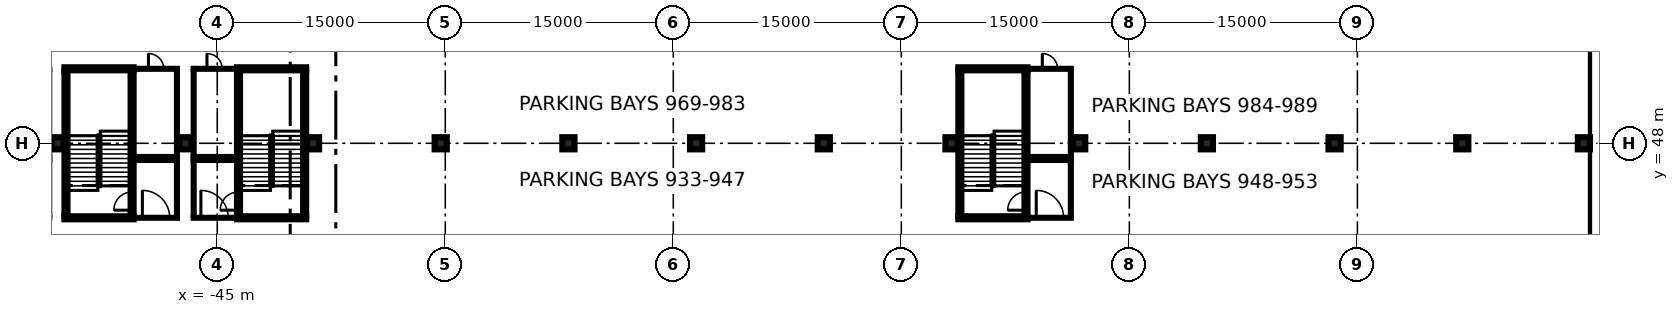
"""IFC4 building model, lengths in metres.
Left out: names, types, materials, properties, quantities, classifications, styles, units other than length and angle.
Written with IfcOpenShell. Run it as: python <this file> out.ifc"""

import sys

from ifc_helpers import new_model, si_unit, direction, frame, frame_2d, origin, origin_2d, place, context, subcontext, project, spatial, rectangle, extrude, element, fill, save


model = new_model("IFC4")
c1 = context("Model", 3, precision=1e-05, world=origin(), true_north=direction((0.0, 1.0)))
c2 = subcontext(c1, "Body", "Model", "MODEL_VIEW")
j1 = project(units=[si_unit("LENGTHUNIT", "METRE"), si_unit("PLANEANGLEUNIT", "RADIAN")], contexts=[c1])
p1 = place(None, origin())
s1 = spatial("IfcSite", under=j1, at=p1, CompositionType="ELEMENT")
p2 = place(p1, origin())
s2 = spatial("IfcBuilding", under=s1, at=p2, CompositionType="ELEMENT")
p3 = place(p2, frame((0.0, 0.0, -12.0)))
s3 = spatial("IfcBuildingStorey", under=s2, at=p3, CompositionType="ELEMENT", Elevation=-12.0)
p4 = place(p3, frame((45.75, -80.0, 0.0), z_axis=(0.0, 0.0, 1.0), x_axis=(0.0, 1.0, 0.0)))
e1 = element("IfcWall", 1, at=p4, inside=s3, PredefinedType="USERDEFINED", context=c2, shape_type="SweptSolid", body=[
    extrude(rectangle(XDim=160.0, YDim=0.9, at=frame_2d((80.0, 0.0))), origin(), (0.0, 0.0, 1.0), 11.55),
])
p5 = place(p2, frame((0.0, 0.0, -7.2)))
s4 = spatial("IfcBuildingStorey", under=s2, at=p5, CompositionType="ELEMENT", Elevation=-7.2)
for number, where, z_axis, x_axis in (
    (2, (-55.5, 48.0, -0.4), (0.0, 0.0, 1.0), (1.0, 0.0, 0.0)),
    (3, (-47.1, 48.0, -0.4), (0.0, 0.0, 1.0), (1.0, 0.0, 0.0)),
    (4, (-38.7, 48.0, -0.4), (0.0, 0.0, 1.0), (1.0, 0.0, 0.0)),
    (5, (-30.3, 48.0, -0.4), (0.0, 0.0, 1.0), (1.0, 0.0, 0.0)),
    (6, (-21.9, 48.0, -0.4), (0.0, 0.0, 1.0), (1.0, 0.0, 0.0)),
    (7, (-13.5, 48.0, -0.4), (0.0, 0.0, 1.0), (1.0, 0.0, 0.0)),
    (8, (-5.1, 48.0, -0.4), (0.0, 0.0, 1.0), (1.0, 0.0, 0.0)),
    (9, (3.3, 48.0, -0.4), (0.0, 0.0, 1.0), (1.0, 0.0, 0.0)),
    (10, (11.7, 48.0, -0.4), (0.0, 0.0, 1.0), (1.0, 0.0, 0.0)),
    (11, (20.1, 48.0, -0.4), (0.0, 0.0, 1.0), (1.0, 0.0, 0.0)),
    (12, (28.5, 48.0, -0.4), (0.0, 0.0, 1.0), (1.0, 0.0, 0.0)),
    (13, (36.9, 48.0, -0.4), (0.0, 0.0, 1.0), (1.0, 0.0, 0.0)),
    (14, (44.9, 48.0, -0.4), (0.0, 0.0, 1.0), (1.0, 0.0, 0.0)),
):
    element("IfcColumn", number, at=place(p5, frame(where, z_axis=z_axis, x_axis=x_axis)), inside=s4, PredefinedType="COLUMN", context=c2, shape_type="SweptSolid", body=[
        extrude(rectangle(XDim=0.8, YDim=0.8, at=origin_2d()), origin(), (0.0, 0.0, 1.0), 3.6),
    ])
p6 = place(p5, frame((-50.5, 43.1, 0.0), z_axis=(0.0, 0.0, 1.0), x_axis=(1.0, 0.0, 0.0)))
e15 = element("IfcWall", 15, at=p6, inside=s4, PredefinedType="PARTITIONING", context=c2, shape_type="SweptSolid", body=[
    extrude(rectangle(XDim=2.95, YDim=0.2, at=frame_2d((1.475, 0.0))), origin(), (0.0, 0.0, 1.0), 3.2),
])
p7 = place(p6, frame((0.575, 0.0, 0.0)))
e16 = element("IfcOpeningElement", 16, at=p7, cuts=e15, PredefinedType="OPENING", context=c2, shape_type="SweptSolid", body=[
    extrude(rectangle(XDim=1.8, YDim=2.1, at=frame_2d((0.9, 1.05))), frame((0.0, 0.11, 0.0), z_axis=(0.0, -1.0, 0.0), x_axis=(1.0, 0.0, 0.0)), (0.0, 0.0, 1.0), 0.22),
])
p8 = place(p5, frame((-50.5, 46.9, 0.0), z_axis=(0.0, 0.0, 1.0), x_axis=(1.0, 0.0, 0.0)))
e17 = element("IfcWall", 17, at=p8, inside=s4, PredefinedType="PARTITIONING", context=c2, shape_type="SweptSolid", body=[
    extrude(rectangle(XDim=2.95, YDim=0.2, at=frame_2d((1.475, 0.0))), origin(), (0.0, 0.0, 1.0), 3.2),
])
p9 = place(p5, frame((-47.65, 43.2, 0.0), z_axis=(0.0, 0.0, 1.0), x_axis=(0.0, 1.0, 0.0)))
e18 = element("IfcWall", 18, at=p9, inside=s4, PredefinedType="PARTITIONING", context=c2, shape_type="SweptSolid", body=[
    extrude(rectangle(XDim=3.6, YDim=0.2, at=frame_2d((1.8, 0.0))), origin(), (0.0, 0.0, 1.0), 3.2),
])
p10 = place(p5, frame((-50.5, 47.1, 0.0), z_axis=(0.0, 0.0, 1.0), x_axis=(1.0, 0.0, 0.0)))
e19 = element("IfcWall", 19, at=p10, inside=s4, PredefinedType="PARTITIONING", context=c2, shape_type="SweptSolid", body=[
    extrude(rectangle(XDim=2.95, YDim=0.2, at=frame_2d((1.475, 0.0))), origin(), (0.0, 0.0, 1.0), 3.2),
])
p11 = place(p5, frame((-50.5, 52.9, 0.0), z_axis=(0.0, 0.0, 1.0), x_axis=(1.0, 0.0, 0.0)))
e20 = element("IfcWall", 20, at=p11, inside=s4, PredefinedType="PARTITIONING", context=c2, shape_type="SweptSolid", body=[
    extrude(rectangle(XDim=2.95, YDim=0.2, at=frame_2d((1.475, 0.0))), origin(), (0.0, 0.0, 1.0), 3.2),
])
p12 = place(p11, frame((0.975, 0.0, 0.0)))
e21 = element("IfcOpeningElement", 21, at=p12, cuts=e20, PredefinedType="OPENING", context=c2, shape_type="SweptSolid", body=[
    extrude(rectangle(XDim=1.0, YDim=2.1, at=frame_2d((0.5, 1.05))), frame((0.0, 0.11, 0.0), z_axis=(0.0, -1.0, 0.0), x_axis=(1.0, 0.0, 0.0)), (0.0, 0.0, 1.0), 0.22),
])
p13 = place(p5, frame((-47.65, 47.2, 0.0), z_axis=(0.0, 0.0, 1.0), x_axis=(0.0, 1.0, 0.0)))
e22 = element("IfcWall", 22, at=p13, inside=s4, PredefinedType="PARTITIONING", context=c2, shape_type="SweptSolid", body=[
    extrude(rectangle(XDim=5.6, YDim=0.2, at=frame_2d((2.8, 0.0))), origin(), (0.0, 0.0, 1.0), 3.2),
])
p14 = place(p5, frame((8.3, 43.1, 0.0), z_axis=(0.0, 0.0, 1.0), x_axis=(1.0, 0.0, 0.0)))
e23 = element("IfcWall", 23, at=p14, inside=s4, PredefinedType="PARTITIONING", context=c2, shape_type="SweptSolid", body=[
    extrude(rectangle(XDim=2.95, YDim=0.2, at=frame_2d((1.475, 0.0))), origin(), (0.0, 0.0, 1.0), 3.2),
])
p15 = place(p14, frame((0.575, 0.0, 0.0)))
e24 = element("IfcOpeningElement", 24, at=p15, cuts=e23, PredefinedType="OPENING", context=c2, shape_type="SweptSolid", body=[
    extrude(rectangle(XDim=1.8, YDim=2.1, at=frame_2d((0.9, 1.05))), frame((0.0, 0.11, 0.0), z_axis=(0.0, -1.0, 0.0), x_axis=(1.0, 0.0, 0.0)), (0.0, 0.0, 1.0), 0.22),
])
p16 = place(p5, frame((8.3, 46.9, 0.0), z_axis=(0.0, 0.0, 1.0), x_axis=(1.0, 0.0, 0.0)))
e25 = element("IfcWall", 25, at=p16, inside=s4, PredefinedType="PARTITIONING", context=c2, shape_type="SweptSolid", body=[
    extrude(rectangle(XDim=2.95, YDim=0.2, at=frame_2d((1.475, 0.0))), origin(), (0.0, 0.0, 1.0), 3.2),
])
p17 = place(p5, frame((11.15, 43.2, 0.0), z_axis=(0.0, 0.0, 1.0), x_axis=(0.0, 1.0, 0.0)))
e26 = element("IfcWall", 26, at=p17, inside=s4, PredefinedType="PARTITIONING", context=c2, shape_type="SweptSolid", body=[
    extrude(rectangle(XDim=3.6, YDim=0.2, at=frame_2d((1.8, 0.0))), origin(), (0.0, 0.0, 1.0), 3.2),
])
p18 = place(p5, frame((8.3, 47.1, 0.0), z_axis=(0.0, 0.0, 1.0), x_axis=(1.0, 0.0, 0.0)))
e27 = element("IfcWall", 27, at=p18, inside=s4, PredefinedType="PARTITIONING", context=c2, shape_type="SweptSolid", body=[
    extrude(rectangle(XDim=2.95, YDim=0.2, at=frame_2d((1.475, 0.0))), origin(), (0.0, 0.0, 1.0), 3.2),
])
p19 = place(p5, frame((8.3, 52.9, 0.0), z_axis=(0.0, 0.0, 1.0), x_axis=(1.0, 0.0, 0.0)))
e28 = element("IfcWall", 28, at=p19, inside=s4, PredefinedType="PARTITIONING", context=c2, shape_type="SweptSolid", body=[
    extrude(rectangle(XDim=2.95, YDim=0.2, at=frame_2d((1.475, 0.0))), origin(), (0.0, 0.0, 1.0), 3.2),
])
p20 = place(p19, frame((0.975, 0.0, 0.0)))
e29 = element("IfcOpeningElement", 29, at=p20, cuts=e28, PredefinedType="OPENING", context=c2, shape_type="SweptSolid", body=[
    extrude(rectangle(XDim=1.0, YDim=2.1, at=frame_2d((0.5, 1.05))), frame((0.0, 0.11, 0.0), z_axis=(0.0, -1.0, 0.0), x_axis=(1.0, 0.0, 0.0)), (0.0, 0.0, 1.0), 0.22),
])
p21 = place(p5, frame((11.15, 47.2, 0.0), z_axis=(0.0, 0.0, 1.0), x_axis=(0.0, 1.0, 0.0)))
e30 = element("IfcWall", 30, at=p21, inside=s4, PredefinedType="PARTITIONING", context=c2, shape_type="SweptSolid", body=[
    extrude(rectangle(XDim=5.6, YDim=0.2, at=frame_2d((2.8, 0.0))), origin(), (0.0, 0.0, 1.0), 3.2),
])
p22 = place(p5, frame((-46.65, 43.1, 0.0), z_axis=(0.0, 0.0, 1.0), x_axis=(1.0, 0.0, 0.0)))
e31 = element("IfcWall", 31, at=p22, inside=s4, PredefinedType="PARTITIONING", context=c2, shape_type="SweptSolid", body=[
    extrude(rectangle(XDim=2.95, YDim=0.2, at=frame_2d((1.475, 0.0))), origin(), (0.0, 0.0, 1.0), 3.2),
])
p23 = place(p22, frame((0.575, 0.0, 0.0)))
e32 = element("IfcOpeningElement", 32, at=p23, cuts=e31, PredefinedType="OPENING", context=c2, shape_type="SweptSolid", body=[
    extrude(rectangle(XDim=1.8, YDim=2.1, at=frame_2d((0.9, 1.05))), frame((0.0, 0.11, 0.0), z_axis=(0.0, -1.0, 0.0), x_axis=(1.0, 0.0, 0.0)), (0.0, 0.0, 1.0), 0.22),
])
p24 = place(p5, frame((-46.65, 46.9, 0.0), z_axis=(0.0, 0.0, 1.0), x_axis=(1.0, 0.0, 0.0)))
e33 = element("IfcWall", 33, at=p24, inside=s4, PredefinedType="PARTITIONING", context=c2, shape_type="SweptSolid", body=[
    extrude(rectangle(XDim=2.95, YDim=0.2, at=frame_2d((1.475, 0.0))), origin(), (0.0, 0.0, 1.0), 3.2),
])
p25 = place(p5, frame((-46.55, 43.2, 0.0), z_axis=(0.0, 0.0, 1.0), x_axis=(0.0, 1.0, 0.0)))
e34 = element("IfcWall", 34, at=p25, inside=s4, PredefinedType="PARTITIONING", context=c2, shape_type="SweptSolid", body=[
    extrude(rectangle(XDim=3.6, YDim=0.2, at=frame_2d((1.8, 0.0))), origin(), (0.0, 0.0, 1.0), 3.2),
])
p26 = place(p5, frame((-46.65, 47.1, 0.0), z_axis=(0.0, 0.0, 1.0), x_axis=(1.0, 0.0, 0.0)))
e35 = element("IfcWall", 35, at=p26, inside=s4, PredefinedType="PARTITIONING", context=c2, shape_type="SweptSolid", body=[
    extrude(rectangle(XDim=2.95, YDim=0.2, at=frame_2d((1.475, 0.0))), origin(), (0.0, 0.0, 1.0), 3.2),
])
p27 = place(p5, frame((-46.65, 52.9, 0.0), z_axis=(0.0, 0.0, 1.0), x_axis=(1.0, 0.0, 0.0)))
e36 = element("IfcWall", 36, at=p27, inside=s4, PredefinedType="PARTITIONING", context=c2, shape_type="SweptSolid", body=[
    extrude(rectangle(XDim=2.95, YDim=0.2, at=frame_2d((1.475, 0.0))), origin(), (0.0, 0.0, 1.0), 3.2),
])
p28 = place(p27, frame((0.975, 0.0, 0.0)))
e37 = element("IfcOpeningElement", 37, at=p28, cuts=e36, PredefinedType="OPENING", context=c2, shape_type="SweptSolid", body=[
    extrude(rectangle(XDim=1.0, YDim=2.1, at=frame_2d((0.5, 1.05))), frame((0.0, 0.11, 0.0), z_axis=(0.0, -1.0, 0.0), x_axis=(1.0, 0.0, 0.0)), (0.0, 0.0, 1.0), 0.22),
])
p29 = place(p5, frame((-46.55, 47.2, 0.0), z_axis=(0.0, 0.0, 1.0), x_axis=(0.0, 1.0, 0.0)))
e38 = element("IfcWall", 38, at=p29, inside=s4, PredefinedType="PARTITIONING", context=c2, shape_type="SweptSolid", body=[
    extrude(rectangle(XDim=5.6, YDim=0.2, at=frame_2d((2.8, 0.0))), origin(), (0.0, 0.0, 1.0), 3.2),
])
p30 = place(p5, frame((-54.95, 43.2, 0.0), z_axis=(0.0, 0.0, 1.0), x_axis=(0.0, 1.0, 0.0)))
e39 = element("IfcWall", 39, at=p30, inside=s4, PredefinedType="SOLIDWALL", context=c2, shape_type="SweptSolid", body=[
    extrude(rectangle(XDim=9.6, YDim=0.2, at=frame_2d((4.8, 0.0))), origin(), (0.0, 0.0, 1.0), 3.2),
])
p31 = place(p5, frame((-50.6, 43.2, 0.0), z_axis=(0.0, 0.0, 1.0), x_axis=(0.0, 1.0, 0.0)))
e40 = element("IfcWall", 40, at=p31, inside=s4, PredefinedType="SOLIDWALL", context=c2, shape_type="SweptSolid", body=[
    extrude(rectangle(XDim=9.6, YDim=0.2, at=frame_2d((4.8, 0.0))), origin(), (0.0, 0.0, 1.0), 3.2),
])
p32 = place(p31, frame((0.4, 0.0, 0.0)))
e41 = element("IfcOpeningElement", 41, at=p32, cuts=e40, PredefinedType="OPENING", context=c2, shape_type="SweptSolid", body=[
    extrude(rectangle(XDim=1.2, YDim=2.1, at=frame_2d((0.6, 1.05))), frame((0.0, 0.11, 0.0), z_axis=(0.0, -1.0, 0.0), x_axis=(1.0, 0.0, 0.0)), (0.0, 0.0, 1.0), 0.22),
])
for number, where, z_axis, x_axis in (
    (42, (-50.5, 43.1, 0.0), (0.0, 0.0, 1.0), (-1.0, 0.0, 0.0)),
    (43, (-55.05, 52.9, 0.0), (0.0, 0.0, 1.0), (1.0, 0.0, 0.0)),
):
    element("IfcWall", number, at=place(p5, frame(where, z_axis=z_axis, x_axis=x_axis)), inside=s4, PredefinedType="SOLIDWALL", context=c2, shape_type="SweptSolid", body=[
        extrude(rectangle(XDim=4.55, YDim=0.2, at=frame_2d((2.275, 0.0))), origin(), (0.0, 0.0, 1.0), 3.2),
    ])
p33 = place(p5, frame((3.85, 43.2, 0.0), z_axis=(0.0, 0.0, 1.0), x_axis=(0.0, 1.0, 0.0)))
e44 = element("IfcWall", 44, at=p33, inside=s4, PredefinedType="SOLIDWALL", context=c2, shape_type="SweptSolid", body=[
    extrude(rectangle(XDim=9.6, YDim=0.2, at=frame_2d((4.8, 0.0))), origin(), (0.0, 0.0, 1.0), 3.2),
])
p34 = place(p5, frame((8.2, 43.2, 0.0), z_axis=(0.0, 0.0, 1.0), x_axis=(0.0, 1.0, 0.0)))
e45 = element("IfcWall", 45, at=p34, inside=s4, PredefinedType="SOLIDWALL", context=c2, shape_type="SweptSolid", body=[
    extrude(rectangle(XDim=9.6, YDim=0.2, at=frame_2d((4.8, 0.0))), origin(), (0.0, 0.0, 1.0), 3.2),
])
p35 = place(p34, frame((0.4, 0.0, 0.0)))
e46 = element("IfcOpeningElement", 46, at=p35, cuts=e45, PredefinedType="OPENING", context=c2, shape_type="SweptSolid", body=[
    extrude(rectangle(XDim=1.2, YDim=2.1, at=frame_2d((0.6, 1.05))), frame((0.0, 0.11, 0.0), z_axis=(0.0, -1.0, 0.0), x_axis=(1.0, 0.0, 0.0)), (0.0, 0.0, 1.0), 0.22),
])
for number, where, z_axis, x_axis in (
    (47, (8.3, 43.1, 0.0), (0.0, 0.0, 1.0), (-1.0, 0.0, 0.0)),
    (48, (3.75, 52.9, 0.0), (0.0, 0.0, 1.0), (1.0, 0.0, 0.0)),
):
    element("IfcWall", number, at=place(p5, frame(where, z_axis=z_axis, x_axis=x_axis)), inside=s4, PredefinedType="SOLIDWALL", context=c2, shape_type="SweptSolid", body=[
        extrude(rectangle(XDim=4.55, YDim=0.2, at=frame_2d((2.275, 0.0))), origin(), (0.0, 0.0, 1.0), 3.2),
    ])
p36 = place(p5, frame((-43.6, 43.2, 0.0), z_axis=(0.0, 0.0, 1.0), x_axis=(0.0, 1.0, 0.0)))
e49 = element("IfcWall", 49, at=p36, inside=s4, PredefinedType="SOLIDWALL", context=c2, shape_type="SweptSolid", body=[
    extrude(rectangle(XDim=9.6, YDim=0.2, at=frame_2d((4.8, 0.0))), origin(), (0.0, 0.0, 1.0), 3.2),
])
p37 = place(p36, frame((0.4, 0.0, 0.0)))
e50 = element("IfcOpeningElement", 50, at=p37, cuts=e49, PredefinedType="OPENING", context=c2, shape_type="SweptSolid", body=[
    extrude(rectangle(XDim=1.2, YDim=2.1, at=frame_2d((0.6, 1.05))), frame((0.0, 0.11, 0.0), z_axis=(0.0, -1.0, 0.0), x_axis=(1.0, 0.0, 0.0)), (0.0, 0.0, 1.0), 0.22),
])
p38 = place(p5, frame((-39.25, 43.2, 0.0), z_axis=(0.0, 0.0, 1.0), x_axis=(0.0, 1.0, 0.0)))
e51 = element("IfcWall", 51, at=p38, inside=s4, PredefinedType="SOLIDWALL", context=c2, shape_type="SweptSolid", body=[
    extrude(rectangle(XDim=9.6, YDim=0.2, at=frame_2d((4.8, 0.0))), origin(), (0.0, 0.0, 1.0), 3.2),
])
for number, where, z_axis, x_axis in (
    (52, (-39.15, 43.1, 0.0), (0.0, 0.0, 1.0), (-1.0, 0.0, 0.0)),
    (53, (-43.7, 52.9, 0.0), (0.0, 0.0, 1.0), (1.0, 0.0, 0.0)),
):
    element("IfcWall", number, at=place(p5, frame(where, z_axis=z_axis, x_axis=x_axis)), inside=s4, PredefinedType="SOLIDWALL", context=c2, shape_type="SweptSolid", body=[
        extrude(rectangle(XDim=4.55, YDim=0.2, at=frame_2d((2.275, 0.0))), origin(), (0.0, 0.0, 1.0), 3.2),
    ])
p39 = place(p7, origin())
e54 = element("IfcDoor", 54, at=p39, inside=s4, OperationType="DOUBLE_DOOR_SINGLE_SWING", PredefinedType="DOOR", context=c2, shape_type="SweptSolid", body=[
    extrude(rectangle(XDim=1.8, YDim=2.1, at=frame_2d((0.9, 1.05))), frame((0.0, 0.025, 0.0), z_axis=(0.0, -1.0, 0.0), x_axis=(1.0, 0.0, 0.0)), (0.0, 0.0, 1.0), 0.05),
])
fill(e16, e54)
p40 = place(p12, origin())
e55 = element("IfcDoor", 55, at=p40, inside=s4, OperationType="SINGLE_SWING_LEFT", PredefinedType="DOOR", context=c2, shape_type="SweptSolid", body=[
    extrude(rectangle(XDim=1.0, YDim=2.1, at=frame_2d((0.5, 1.05))), frame((0.0, 0.025, 0.0), z_axis=(0.0, -1.0, 0.0), x_axis=(1.0, 0.0, 0.0)), (0.0, 0.0, 1.0), 0.05),
])
fill(e21, e55)
p41 = place(p15, origin())
e56 = element("IfcDoor", 56, at=p41, inside=s4, OperationType="DOUBLE_DOOR_SINGLE_SWING", PredefinedType="DOOR", context=c2, shape_type="SweptSolid", body=[
    extrude(rectangle(XDim=1.8, YDim=2.1, at=frame_2d((0.9, 1.05))), frame((0.0, 0.025, 0.0), z_axis=(0.0, -1.0, 0.0), x_axis=(1.0, 0.0, 0.0)), (0.0, 0.0, 1.0), 0.05),
])
fill(e24, e56)
p42 = place(p20, origin())
e57 = element("IfcDoor", 57, at=p42, inside=s4, OperationType="SINGLE_SWING_LEFT", PredefinedType="DOOR", context=c2, shape_type="SweptSolid", body=[
    extrude(rectangle(XDim=1.0, YDim=2.1, at=frame_2d((0.5, 1.05))), frame((0.0, 0.025, 0.0), z_axis=(0.0, -1.0, 0.0), x_axis=(1.0, 0.0, 0.0)), (0.0, 0.0, 1.0), 0.05),
])
fill(e29, e57)
p43 = place(p23, origin())
e58 = element("IfcDoor", 58, at=p43, inside=s4, OperationType="DOUBLE_DOOR_SINGLE_SWING", PredefinedType="DOOR", context=c2, shape_type="SweptSolid", body=[
    extrude(rectangle(XDim=1.8, YDim=2.1, at=frame_2d((0.9, 1.05))), frame((0.0, 0.025, 0.0), z_axis=(0.0, -1.0, 0.0), x_axis=(1.0, 0.0, 0.0)), (0.0, 0.0, 1.0), 0.05),
])
fill(e32, e58)
p44 = place(p28, origin())
e59 = element("IfcDoor", 59, at=p44, inside=s4, OperationType="SINGLE_SWING_LEFT", PredefinedType="DOOR", context=c2, shape_type="SweptSolid", body=[
    extrude(rectangle(XDim=1.0, YDim=2.1, at=frame_2d((0.5, 1.05))), frame((0.0, 0.025, 0.0), z_axis=(0.0, -1.0, 0.0), x_axis=(1.0, 0.0, 0.0)), (0.0, 0.0, 1.0), 0.05),
])
fill(e37, e59)
p45 = place(p32, origin())
e60 = element("IfcDoor", 60, at=p45, inside=s4, OperationType="SINGLE_SWING_LEFT", PredefinedType="DOOR", context=c2, shape_type="SweptSolid", body=[
    extrude(rectangle(XDim=1.2, YDim=2.1, at=frame_2d((0.6, 1.05))), frame((0.0, 0.025, 0.0), z_axis=(0.0, -1.0, 0.0), x_axis=(1.0, 0.0, 0.0)), (0.0, 0.0, 1.0), 0.05),
])
fill(e41, e60)
p46 = place(p35, origin())
e61 = element("IfcDoor", 61, at=p46, inside=s4, OperationType="SINGLE_SWING_LEFT", PredefinedType="DOOR", context=c2, shape_type="SweptSolid", body=[
    extrude(rectangle(XDim=1.2, YDim=2.1, at=frame_2d((0.6, 1.05))), frame((0.0, 0.025, 0.0), z_axis=(0.0, -1.0, 0.0), x_axis=(1.0, 0.0, 0.0)), (0.0, 0.0, 1.0), 0.05),
])
fill(e46, e61)
p47 = place(p37, origin())
e62 = element("IfcDoor", 62, at=p47, inside=s4, OperationType="SINGLE_SWING_LEFT", PredefinedType="DOOR", context=c2, shape_type="SweptSolid", body=[
    extrude(rectangle(XDim=1.2, YDim=2.1, at=frame_2d((0.6, 1.05))), frame((0.0, 0.025, 0.0), z_axis=(0.0, -1.0, 0.0), x_axis=(1.0, 0.0, 0.0)), (0.0, 0.0, 1.0), 0.05),
])
fill(e50, e62)
save(model, sys.argv[1])
